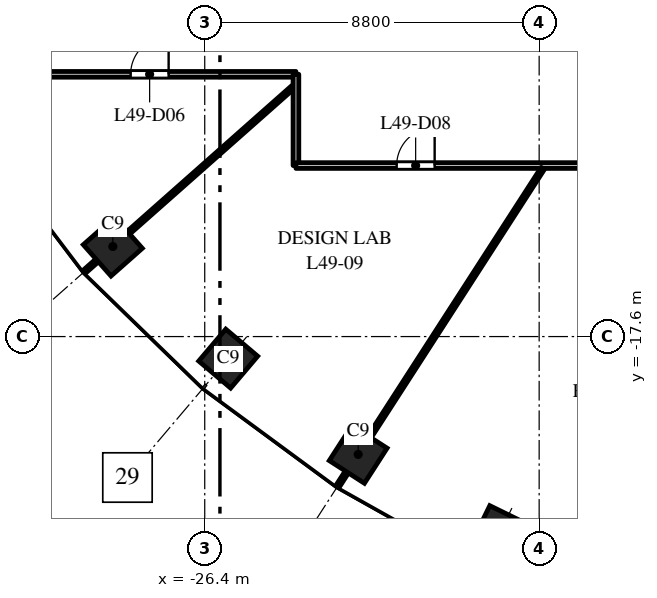
"""IFC4 building model, lengths in metres.
Left out: names, types, materials, properties, quantities, classifications, styles, units other than length and angle.
Written with IfcOpenShell. Run it as: python <this file> out.ifc"""

import sys

from ifc_helpers import new_model, si_unit, direction, frame, frame_2d, origin, origin_2d, place, context, subcontext, project, spatial, rectangle, extrude, element, fill, save


model = new_model("IFC4")
c1 = context("Model", 3, precision=1e-05, world=origin(), true_north=direction((0.0, 1.0)))
c2 = subcontext(c1, "Body", "Model", "MODEL_VIEW")
j1 = project(units=[si_unit("LENGTHUNIT", "METRE"), si_unit("PLANEANGLEUNIT", "RADIAN")], contexts=[c1])
p1 = place(None, origin())
s1 = spatial("IfcSite", under=j1, at=p1, CompositionType="ELEMENT")
p2 = place(p1, origin())
s2 = spatial("IfcBuilding", under=s1, at=p2, CompositionType="ELEMENT")
p3 = place(p2, frame((0.0, 0.0, 237.5)))
s3 = spatial("IfcBuildingStorey", under=s2, at=p3, CompositionType="ELEMENT", Elevation=237.5)
for number, where, z_axis, x_axis in (
    (1, (-28.819, -15.23, 0.0), (0.0, 0.0, 1.0), (0.663, -0.749, 0.0)),
    (2, (-25.783, -18.18, 0.0), (0.0, 0.0, 1.0), (0.763, -0.646, 0.0)),
    (3, (-22.362, -20.7, 0.0), (0.0, 0.0, 1.0), (0.84, -0.542, 0.0)),
    (4, (-18.646, -22.785, 0.0), (0.0, 0.0, 1.0), (0.898, -0.439, 0.0)),
):
    element("IfcColumn", number, at=place(p3, frame(where, z_axis=z_axis, x_axis=x_axis)), inside=s3, PredefinedType="COLUMN", context=c2, shape_type="SweptSolid", body=[
        extrude(rectangle(XDim=1.1, YDim=1.1, at=origin_2d()), origin(), (0.0, 0.0, 1.0), 4.0),
    ])
p4 = place(p3, frame((-31.5, -10.7, 0.0), z_axis=(0.0, 0.0, 1.0), x_axis=(1.0, 0.0, 0.0)))
e5 = element("IfcWall", 5, at=p4, inside=s3, PredefinedType="PARTITIONING", context=c2, shape_type="SweptSolid", body=[
    extrude(rectangle(XDim=7.5, YDim=0.15, at=frame_2d((3.75, 0.0))), origin(), (0.0, 0.0, 1.0), 3.1),
])
p5 = place(p4, frame((3.15, 0.0, 0.0)))
e6 = element("IfcOpeningElement", 6, at=p5, cuts=e5, PredefinedType="OPENING", context=c2, shape_type="SweptSolid", body=[
    extrude(rectangle(XDim=1.0, YDim=2.1, at=frame_2d((0.5, 1.05))), frame((0.0, 0.085, 0.0), z_axis=(0.0, -1.0, 0.0), x_axis=(1.0, 0.0, 0.0)), (0.0, 0.0, 1.0), 0.17),
])
p6 = place(p3, frame((-29.569, -15.895, 0.0), z_axis=(0.0, 0.0, 1.0), x_axis=(0.748936848479, 0.662641378869, 0.0)))
e7 = element("IfcWall", 7, at=p6, inside=s3, PredefinedType="PARTITIONING", context=c2, shape_type="SweptSolid", body=[
    extrude(rectangle(XDim=7.336, YDim=0.1, at=frame_2d((3.668, 0.0))), origin(), (0.0, 0.0, 1.0), 3.0),
])
p7 = place(p3, frame((-24.0, -13.1, 0.0), z_axis=(0.0, 0.0, 1.0), x_axis=(0.0, 1.0, 0.0)))
e8 = element("IfcWall", 8, at=p7, inside=s3, PredefinedType="PARTITIONING", context=c2, shape_type="SweptSolid", body=[
    extrude(rectangle(XDim=2.4, YDim=0.15, at=frame_2d((1.2, 0.0))), origin(), (0.0, 0.0, 1.0), 3.7),
])
p8 = place(p3, frame((-24.0, -13.1, 0.0), z_axis=(0.0, 0.0, 1.0), x_axis=(1.0, 0.0, 0.0)))
e9 = element("IfcWall", 9, at=p8, inside=s3, PredefinedType="PARTITIONING", context=c2, shape_type="SweptSolid", body=[
    extrude(rectangle(XDim=13.357, YDim=0.15, at=frame_2d((6.678, 0.0))), origin(), (0.0, 0.0, 1.0), 2.75),
])
p9 = place(p8, frame((2.65, 0.0, 0.0)))
e10 = element("IfcOpeningElement", 10, at=p9, cuts=e9, PredefinedType="OPENING", context=c2, shape_type="SweptSolid", body=[
    extrude(rectangle(XDim=1.0, YDim=2.1, at=frame_2d((0.5, 1.05))), frame((0.0, 0.085, 0.0), z_axis=(0.0, -1.0, 0.0), x_axis=(1.0, 0.0, 0.0)), (0.0, 0.0, 1.0), 0.17),
])
p10 = place(p8, frame((9.436, 0.0, 0.0)))
e11 = element("IfcOpeningElement", 11, at=p10, cuts=e9, PredefinedType="OPENING", context=c2, shape_type="SweptSolid", body=[
    extrude(rectangle(XDim=1.0, YDim=2.1, at=frame_2d((0.5, 1.05))), frame((0.0, 0.085, 0.0), z_axis=(0.0, -1.0, 0.0), x_axis=(1.0, 0.0, 0.0)), (0.0, 0.0, 1.0), 0.17),
])
p11 = place(p3, frame((-22.905, -21.542, 0.0), z_axis=(0.0, 0.0, 1.0), x_axis=(0.542277075573, 0.840199722273, 0.0)))
e12 = element("IfcWall", 12, at=p11, inside=s3, PredefinedType="PARTITIONING", context=c2, shape_type="SweptSolid", body=[
    extrude(rectangle(XDim=9.958, YDim=0.1, at=frame_2d((4.979, 0.0))), origin(), (0.0, 0.0, 1.0), 3.0),
])
p12 = place(p5, origin())
e13 = element("IfcDoor", 13, at=p12, inside=s3, OperationType="SINGLE_SWING_RIGHT", PredefinedType="DOOR", context=c2, shape_type="SweptSolid", body=[
    extrude(rectangle(XDim=1.0, YDim=2.1, at=frame_2d((0.5, 1.05))), frame((0.0, 0.025, 0.0), z_axis=(0.0, -1.0, 0.0), x_axis=(1.0, 0.0, 0.0)), (0.0, 0.0, 1.0), 0.05),
])
fill(e6, e13)
p13 = place(p9, origin())
e14 = element("IfcDoor", 14, at=p13, inside=s3, OperationType="SINGLE_SWING_RIGHT", PredefinedType="DOOR", context=c2, shape_type="SweptSolid", body=[
    extrude(rectangle(XDim=1.0, YDim=2.1, at=frame_2d((0.5, 1.05))), frame((0.0, 0.025, 0.0), z_axis=(0.0, -1.0, 0.0), x_axis=(1.0, 0.0, 0.0)), (0.0, 0.0, 1.0), 0.05),
])
fill(e10, e14)
save(model, sys.argv[1])
